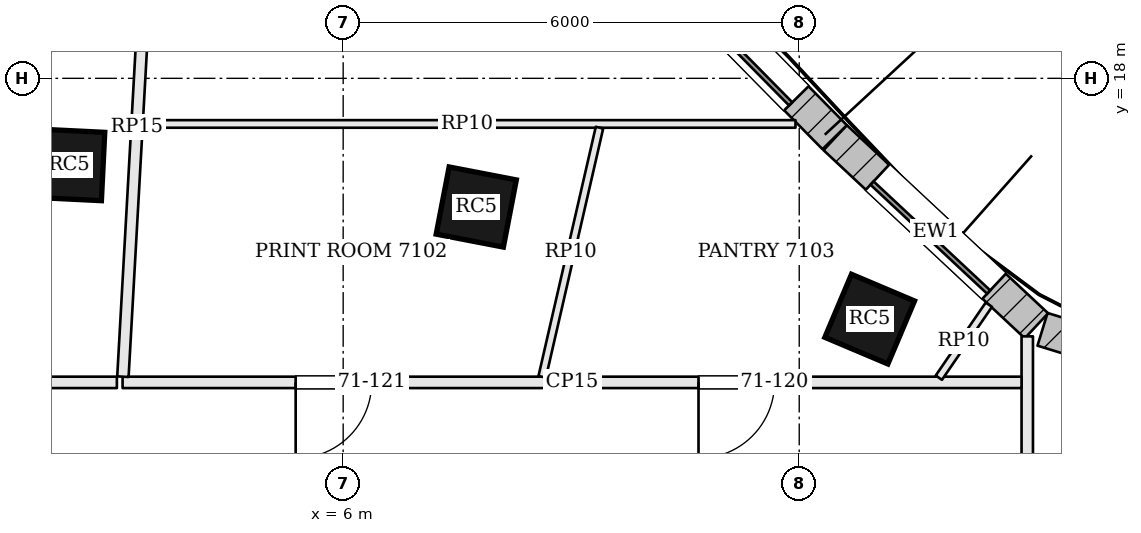
"""IFC4 building model, lengths in metres.
Left out: names, types, materials, properties, quantities, classifications, styles, units other than length and angle.
Written with IfcOpenShell. Run it as: python <this file> out.ifc"""

import sys

from ifc_helpers import new_model, si_unit, direction, frame, frame_2d, origin, origin_2d, place, context, subcontext, project, spatial, rectangle, extrude, element, fill, save


model = new_model("IFC4")
c1 = context("Model", 3, precision=1e-05, world=origin(), true_north=direction((0.0, 1.0)))
c2 = subcontext(c1, "Body", "Model", "MODEL_VIEW")
j1 = project(units=[si_unit("LENGTHUNIT", "METRE"), si_unit("PLANEANGLEUNIT", "RADIAN")], contexts=[c1])
p1 = place(None, origin())
s1 = spatial("IfcSite", under=j1, at=p1, CompositionType="ELEMENT")
p2 = place(p1, origin())
s2 = spatial("IfcBuilding", under=s1, at=p2, CompositionType="ELEMENT")
p3 = place(p2, frame((0.0, 0.0, 288.3)))
s3 = spatial("IfcBuildingStorey", under=s2, at=p3, CompositionType="ELEMENT", Elevation=288.3)
for number, where, z_axis, x_axis in (
    (1, (12.927, 14.832, 0.0), (0.0, 0.0, 1.0), (-0.921, 0.389, 0.0)),
    (2, (7.751, 16.307, 0.0), (0.0, 0.0, 1.0), (-0.982, 0.189, 0.0)),
    (3, (2.392, 16.862, 0.0), (0.0, 0.0, 1.0), (-0.999, 0.049, 0.0)),
):
    element("IfcColumn", number, at=place(p3, frame(where, z_axis=z_axis, x_axis=x_axis)), inside=s3, PredefinedType="COLUMN", context=c2, shape_type="SweptSolid", body=[
        extrude(rectangle(XDim=0.9, YDim=0.9, at=origin_2d()), origin(), (0.0, 0.0, 1.0), 3.9),
    ])
p4 = place(p3, frame((18.958, 13.542, 0.0), z_axis=(0.0, 0.0, 1.0), x_axis=(-0.955792437529, 0.294042201668, 0.0)))
e4 = element("IfcWall", 4, at=p4, inside=s3, PredefinedType="SOLIDWALL", context=c2, shape_type="SweptSolid", body=[
    extrude(rectangle(XDim=3.931, YDim=0.45, at=frame_2d((1.965, 0.0))), origin(), (0.0, 0.0, 1.0), 3.7),
])
p5 = place(p4, frame((0.915, 0.0, 0.9)))
e5 = element("IfcOpeningElement", 5, at=p5, cuts=e4, PredefinedType="OPENING", context=c2, shape_type="SweptSolid", body=[
    extrude(rectangle(XDim=2.1, YDim=2.3, at=frame_2d((1.05, 1.15))), frame((0.0, 0.235, 0.0), z_axis=(0.0, -1.0, 0.0), x_axis=(1.0, 0.0, 0.0)), (0.0, 0.0, 1.0), 0.47),
])
p6 = place(p3, frame((15.121, 14.745, 0.0), z_axis=(0.0, 0.0, 1.0), x_axis=(-0.730618259172, 0.68278617397, 0.0)))
e6 = element("IfcWall", 6, at=p6, inside=s3, PredefinedType="SOLIDWALL", context=c2, shape_type="SweptSolid", body=[
    extrude(rectangle(XDim=3.624, YDim=0.45, at=frame_2d((1.812, 0.0))), origin(), (0.0, 0.0, 1.0), 3.7),
])
p7 = place(p6, frame((0.762, 0.0, 0.9)))
e7 = element("IfcOpeningElement", 7, at=p7, cuts=e6, PredefinedType="OPENING", context=c2, shape_type="SweptSolid", body=[
    extrude(rectangle(XDim=2.1, YDim=2.3, at=frame_2d((1.05, 1.15))), frame((0.0, 0.235, 0.0), z_axis=(0.0, -1.0, 0.0), x_axis=(1.0, 0.0, 0.0)), (0.0, 0.0, 1.0), 0.47),
])
p8 = place(p3, frame((12.466, 17.226, 0.0), z_axis=(0.0, 0.0, 1.0), x_axis=(-0.701875966769, 0.712299183821, 0.0)))
e8 = element("IfcWall", 8, at=p8, inside=s3, PredefinedType="SOLIDWALL", context=c2, shape_type="SweptSolid", body=[
    extrude(rectangle(XDim=3.537, YDim=0.45, at=frame_2d((1.769, 0.0))), origin(), (0.0, 0.0, 1.0), 3.7),
])
p9 = place(p8, frame((0.718, 0.0, 0.9)))
e9 = element("IfcOpeningElement", 9, at=p9, cuts=e8, PredefinedType="OPENING", context=c2, shape_type="SweptSolid", body=[
    extrude(rectangle(XDim=2.1, YDim=2.3, at=frame_2d((1.05, 1.15))), frame((0.0, 0.235, 0.0), z_axis=(0.0, -1.0, 0.0), x_axis=(1.0, 0.0, 0.0)), (0.0, 0.0, 1.0), 0.47),
])
p10 = place(p3, frame((15.0, 7.979, 0.0), z_axis=(0.0, 0.0, 1.0), x_axis=(0.0, 1.0, 0.0)))
e10 = element("IfcWall", 10, at=p10, inside=s3, PredefinedType="PARTITIONING", context=c2, shape_type="SweptSolid", body=[
    extrude(rectangle(XDim=6.626, YDim=0.15, at=frame_2d((3.313, 0.0))), origin(), (0.0, 0.0, 1.0), 3.198),
])
p11 = place(p10, frame((0.759, 0.0, 0.0)))
e11 = element("IfcOpeningElement", 11, at=p11, cuts=e10, PredefinedType="OPENING", context=c2, shape_type="SweptSolid", body=[
    extrude(rectangle(XDim=1.8, YDim=2.1, at=frame_2d((0.9, 1.05))), frame((0.0, 0.085, 0.0), z_axis=(0.0, -1.0, 0.0), x_axis=(1.0, 0.0, 0.0)), (0.0, 0.0, 1.0), 0.17),
])
p12 = place(p3, frame((14.925, 14.0, 0.0), z_axis=(0.0, 0.0, 1.0), x_axis=(-1.0, 0.0, 0.0)))
e12 = element("IfcWall", 12, at=p12, inside=s3, PredefinedType="PARTITIONING", context=c2, shape_type="SweptSolid", body=[
    extrude(rectangle(XDim=11.827, YDim=0.15, at=frame_2d((5.914, 0.0))), origin(), (0.0, 0.0, 1.0), 3.198),
])
p13 = place(p12, frame((3.25, 0.0, 0.0)))
e13 = element("IfcOpeningElement", 13, at=p13, cuts=e12, PredefinedType="OPENING", context=c2, shape_type="SweptSolid", body=[
    extrude(rectangle(XDim=1.0, YDim=2.1, at=frame_2d((0.5, 1.05))), frame((0.0, 0.085, 0.0), z_axis=(0.0, -1.0, 0.0), x_axis=(1.0, 0.0, 0.0)), (0.0, 0.0, 1.0), 0.17),
])
p14 = place(p12, frame((8.55, 0.0, 0.0)))
e14 = element("IfcOpeningElement", 14, at=p14, cuts=e12, PredefinedType="OPENING", context=c2, shape_type="SweptSolid", body=[
    extrude(rectangle(XDim=1.0, YDim=2.1, at=frame_2d((0.5, 1.05))), frame((0.0, 0.085, 0.0), z_axis=(0.0, -1.0, 0.0), x_axis=(1.0, 0.0, 0.0)), (0.0, 0.0, 1.0), 0.17),
])
p15 = place(p3, frame((3.47, 20.638, 0.0), z_axis=(0.0, 0.0, 1.0), x_axis=(-0.055969858851, -0.998432458857, 0.0)))
e15 = element("IfcWall", 15, at=p15, inside=s3, PredefinedType="PARTITIONING", context=c2, shape_type="SweptSolid", body=[
    extrude(rectangle(XDim=6.573, YDim=0.15, at=frame_2d((3.287, 0.0))), origin(), (0.0, 0.0, 1.0), 3.234),
])
p16 = place(p3, frame((3.023, 14.0, 0.0), z_axis=(0.0, 0.0, 1.0), x_axis=(-1.0, 0.0, 0.0)))
e16 = element("IfcWall", 16, at=p16, inside=s3, PredefinedType="PARTITIONING", context=c2, shape_type="SweptSolid", body=[
    extrude(rectangle(XDim=16.684, YDim=0.15, at=frame_2d((8.342, 0.0))), origin(), (0.0, 0.0, 1.0), 3.198),
])
p17 = place(p16, frame((10.628, 0.0, 0.0)))
e17 = element("IfcOpeningElement", 17, at=p17, cuts=e16, PredefinedType="OPENING", context=c2, shape_type="SweptSolid", body=[
    extrude(rectangle(XDim=1.8, YDim=2.1, at=frame_2d((0.9, 1.05))), frame((0.0, 0.085, 0.0), z_axis=(0.0, -1.0, 0.0), x_axis=(1.0, 0.0, 0.0)), (0.0, 0.0, 1.0), 0.17),
])
p18 = place(p3, frame((3.309, 17.4, 0.0), z_axis=(0.0, 0.0, 1.0), x_axis=(1.0, 0.0, 0.0)))
e18 = element("IfcWall", 18, at=p18, inside=s3, PredefinedType="PARTITIONING", context=c2, shape_type="SweptSolid", body=[
    extrude(rectangle(XDim=8.642, YDim=0.1, at=frame_2d((4.321, 0.0))), origin(), (0.0, 0.0, 1.0), 3.198),
])
p19 = place(p3, frame((13.837, 14.062, 0.0), z_axis=(0.0, 0.0, 1.0), x_axis=(0.565495744886, 0.824751212497, 0.0)))
e19 = element("IfcWall", 19, at=p19, inside=s3, PredefinedType="PARTITIONING", context=c2, shape_type="SweptSolid", body=[
    extrude(rectangle(XDim=1.164, YDim=0.1, at=frame_2d((0.582, 0.0))), origin(), (0.0, 0.0, 1.0), 3.198),
])
p20 = place(p3, frame((8.618, 14.073, 0.0), z_axis=(0.0, 0.0, 1.0), x_axis=(0.224048430302, 0.974578011695, 0.0)))
e20 = element("IfcWall", 20, at=p20, inside=s3, PredefinedType="PARTITIONING", context=c2, shape_type="SweptSolid", body=[
    extrude(rectangle(XDim=3.364, YDim=0.1, at=frame_2d((1.682, 0.0))), origin(), (0.0, 0.0, 1.0), 3.198),
])
p21 = place(p7, origin())
e21 = element("IfcWindow", 21, at=p21, inside=s3, PartitioningType="SINGLE_PANEL", PredefinedType="WINDOW", context=c2, shape_type="SweptSolid", body=[
    extrude(rectangle(XDim=2.1, YDim=2.3, at=frame_2d((1.05, 1.15))), frame((0.0, 0.135, 0.0), z_axis=(0.0, -1.0, 0.0), x_axis=(1.0, 0.0, 0.0)), (0.0, 0.0, 1.0), 0.06),
])
fill(e7, e21)
p22 = place(p9, origin())
e22 = element("IfcWindow", 22, at=p22, inside=s3, PartitioningType="SINGLE_PANEL", PredefinedType="WINDOW", context=c2, shape_type="SweptSolid", body=[
    extrude(rectangle(XDim=2.1, YDim=2.3, at=frame_2d((1.05, 1.15))), frame((0.0, 0.135, 0.0), z_axis=(0.0, -1.0, 0.0), x_axis=(1.0, 0.0, 0.0)), (0.0, 0.0, 1.0), 0.06),
])
fill(e9, e22)
p23 = place(p13, origin())
e23 = element("IfcDoor", 23, at=p23, inside=s3, OperationType="SINGLE_SWING_RIGHT", PredefinedType="DOOR", context=c2, shape_type="SweptSolid", body=[
    extrude(rectangle(XDim=1.0, YDim=2.1, at=frame_2d((0.5, 1.05))), frame((0.0, 0.025, 0.0), z_axis=(0.0, -1.0, 0.0), x_axis=(1.0, 0.0, 0.0)), (0.0, 0.0, 1.0), 0.05),
])
fill(e13, e23)
p24 = place(p14, origin())
e24 = element("IfcDoor", 24, at=p24, inside=s3, OperationType="SINGLE_SWING_RIGHT", PredefinedType="DOOR", context=c2, shape_type="SweptSolid", body=[
    extrude(rectangle(XDim=1.0, YDim=2.1, at=frame_2d((0.5, 1.05))), frame((0.0, 0.025, 0.0), z_axis=(0.0, -1.0, 0.0), x_axis=(1.0, 0.0, 0.0)), (0.0, 0.0, 1.0), 0.05),
])
fill(e14, e24)
save(model, sys.argv[1])
